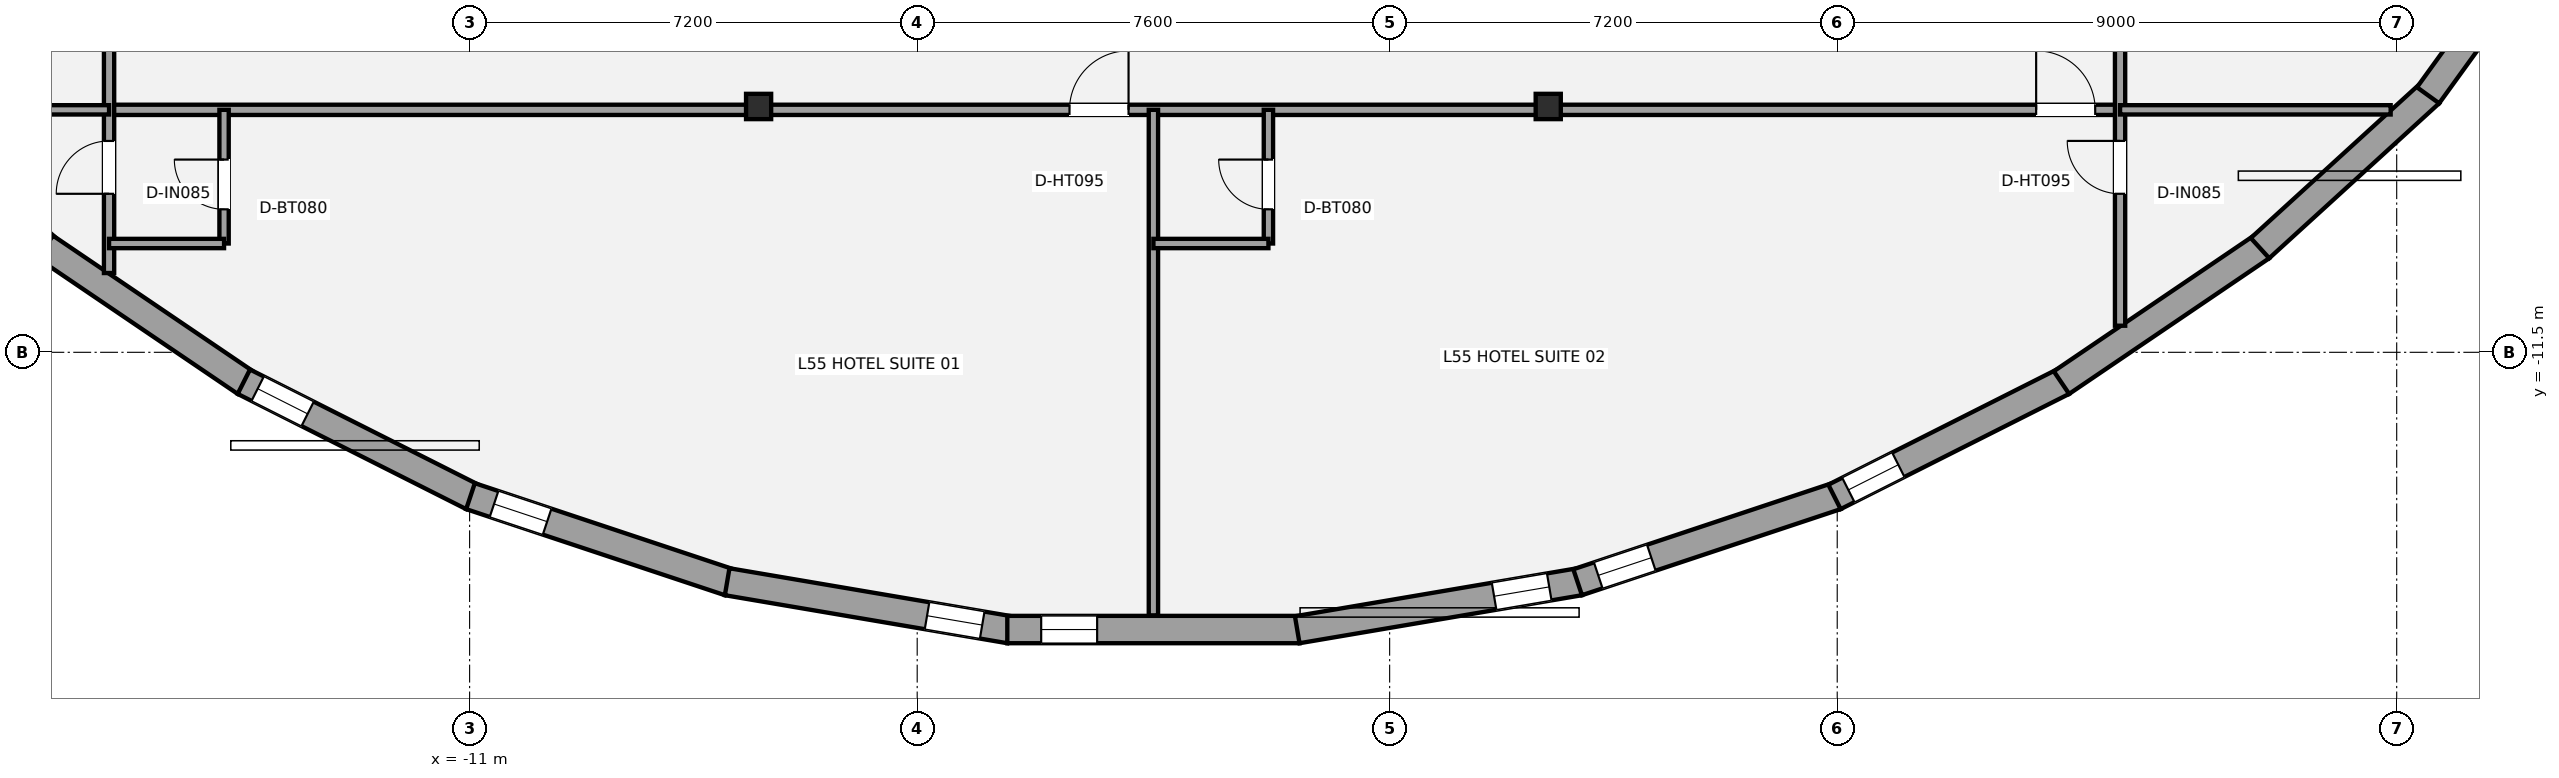
"""IFC4 building model, lengths in metres.
Left out: names, types, materials, properties, quantities, classifications, styles, units other than length and angle.
Written with IfcOpenShell. Run it as: python <this file> out.ifc"""

import sys

from ifc_helpers import new_model, si_unit, direction, frame, frame_2d, origin, origin_2d, place, context, subcontext, project, spatial, rectangle, i_section, extrude, element, fill, save


model = new_model("IFC4")
c1 = context("Model", 3, precision=1e-05, world=origin(), true_north=direction((0.0, 1.0)))
c2 = subcontext(c1, "Body", "Model", "MODEL_VIEW")
j1 = project(units=[si_unit("LENGTHUNIT", "METRE"), si_unit("PLANEANGLEUNIT", "RADIAN")], contexts=[c1])
p1 = place(None, origin())
s1 = spatial("IfcSite", under=j1, at=p1, CompositionType="ELEMENT")
p2 = place(p1, origin())
s2 = spatial("IfcBuilding", under=s1, at=p2, CompositionType="ELEMENT")
p3 = place(p2, frame((0.0, 0.0, 198.2)))
s3 = spatial("IfcBuildingStorey", under=s2, at=p3, CompositionType="ELEMENT", Elevation=198.2)
for number, where, z_axis, x_axis in (
    (1, (-6.351, -7.546, 0.0), (0.0, 0.0, 1.0), (1.0, 0.0, 0.0)),
    (2, (6.351, -7.546, 0.0), (0.0, 0.0, 1.0), (1.0, 0.0, 0.0)),
):
    element("IfcColumn", number, at=place(p3, frame(where, z_axis=z_axis, x_axis=x_axis)), inside=s3, PredefinedType="COLUMN", context=c2, shape_type="SweptSolid", body=[
        extrude(i_section(OverallWidth=0.404, OverallDepth=0.407, WebThickness=0.027, FlangeThickness=0.044, at=origin_2d()), origin(), (0.0, 0.0, 1.0), 3.2),
    ])
p4 = place(p3, frame((-17.801, -9.824, 0.0), z_axis=(0.0, 0.0, 1.0), x_axis=(-0.738992571182, 0.67371357396, 0.0)))
e3 = element("IfcWall", 3, at=p4, inside=s3, PredefinedType="STANDARD", context=c2, shape_type="SweptSolid", body=[
    extrude(rectangle(XDim=3.699, YDim=0.44, at=frame_2d((1.849, 0.0))), origin(), (0.0, 0.0, 1.0), 2.255),
])
p5 = place(p3, frame((-14.607, -11.987, 0.0), z_axis=(0.0, 0.0, 1.0), x_axis=(-0.827697624009, 0.561174342972, 0.0)))
e4 = element("IfcWall", 4, at=p5, inside=s3, PredefinedType="STANDARD", context=c2, shape_type="SweptSolid", body=[
    extrude(rectangle(XDim=3.888, YDim=0.44, at=frame_2d((1.944, 0.0))), origin(), (0.0, 0.0, 1.0), 2.255),
])
p6 = place(p3, frame((-10.956, -13.826, 0.0), z_axis=(0.0, 0.0, 1.0), x_axis=(-0.892939479035, 0.450176728387, 0.0)))
e5 = element("IfcWall", 5, at=p6, inside=s3, PredefinedType="STANDARD", context=c2, shape_type="SweptSolid", body=[
    extrude(rectangle(XDim=4.116, YDim=0.44, at=frame_2d((2.058, 0.0))), origin(), (0.0, 0.0, 1.0), 2.255),
])
p7 = place(p6, frame((2.967, 0.0, 0.58)))
e6 = element("IfcOpeningElement", 6, at=p7, cuts=e5, PredefinedType="OPENING", context=c2, shape_type="SweptSolid", body=[
    extrude(rectangle(XDim=0.9, YDim=1.35, at=frame_2d((0.45, 0.675))), frame((0.0, 0.23, 0.0), z_axis=(0.0, -1.0, 0.0), x_axis=(1.0, 0.0, 0.0)), (0.0, 0.0, 1.0), 0.46),
])
p8 = place(p3, frame((-6.824, -15.198, 0.0), z_axis=(0.0, 0.0, 1.0), x_axis=(-0.94886128517, 0.315693302916, 0.0)))
e7 = element("IfcWall", 7, at=p8, inside=s3, PredefinedType="STANDARD", context=c2, shape_type="SweptSolid", body=[
    extrude(rectangle(XDim=4.386, YDim=0.44, at=frame_2d((2.193, 0.0))), origin(), (0.0, 0.0, 1.0), 2.255),
])
p9 = place(p8, frame((3.087, 0.0, 0.58)))
e8 = element("IfcOpeningElement", 8, at=p9, cuts=e7, PredefinedType="OPENING", context=c2, shape_type="SweptSolid", body=[
    extrude(rectangle(XDim=0.9, YDim=1.35, at=frame_2d((0.45, 0.675))), frame((0.0, 0.23, 0.0), z_axis=(0.0, -1.0, 0.0), x_axis=(1.0, 0.0, 0.0)), (0.0, 0.0, 1.0), 0.46),
])
p10 = place(p3, frame((-2.313, -15.962, 0.0), z_axis=(0.0, 0.0, 1.0), x_axis=(-0.985860485502, 0.167568204398, 0.0)))
e9 = element("IfcWall", 9, at=p10, inside=s3, PredefinedType="STANDARD", context=c2, shape_type="SweptSolid", body=[
    extrude(rectangle(XDim=4.608, YDim=0.44, at=frame_2d((2.304, 0.0))), origin(), (0.0, 0.0, 1.0), 2.255),
])
p11 = place(p10, frame((0.447, 0.0, 0.58)))
e10 = element("IfcOpeningElement", 10, at=p11, cuts=e9, PredefinedType="OPENING", context=c2, shape_type="SweptSolid", body=[
    extrude(rectangle(XDim=0.9, YDim=1.35, at=frame_2d((0.45, 0.675))), frame((0.0, 0.23, 0.0), z_axis=(0.0, -1.0, 0.0), x_axis=(1.0, 0.0, 0.0)), (0.0, 0.0, 1.0), 0.46),
])
p12 = place(p3, frame((2.35, -15.959, 0.0), z_axis=(0.0, 0.0, 1.0), x_axis=(-1.0, 0.0, 0.0)))
e11 = element("IfcWall", 11, at=p12, inside=s3, PredefinedType="STANDARD", context=c2, shape_type="SweptSolid", body=[
    extrude(rectangle(XDim=4.701, YDim=0.44, at=frame_2d((2.35, 0.0))), origin(), (0.0, 0.0, 1.0), 2.255),
])
p13 = place(p12, frame((3.256, 0.0, 0.58)))
e12 = element("IfcOpeningElement", 12, at=p13, cuts=e11, PredefinedType="OPENING", context=c2, shape_type="SweptSolid", body=[
    extrude(rectangle(XDim=0.9, YDim=1.35, at=frame_2d((0.45, 0.675))), frame((0.0, 0.23, 0.0), z_axis=(0.0, -1.0, 0.0), x_axis=(1.0, 0.0, 0.0)), (0.0, 0.0, 1.0), 0.46),
])
p14 = place(p3, frame((6.857, -15.19, 0.0), z_axis=(0.0, 0.0, 1.0), x_axis=(-0.985860485502, -0.167568204398, 0.0)))
e13 = element("IfcWall", 13, at=p14, inside=s3, PredefinedType="STANDARD", context=c2, shape_type="SweptSolid", body=[
    extrude(rectangle(XDim=4.608, YDim=0.44, at=frame_2d((2.304, 0.0))), origin(), (0.0, 0.0, 1.0), 2.255),
])
p15 = place(p14, frame((0.496, 0.0, 0.58)))
e14 = element("IfcOpeningElement", 14, at=p15, cuts=e13, PredefinedType="OPENING", context=c2, shape_type="SweptSolid", body=[
    extrude(rectangle(XDim=0.9, YDim=1.35, at=frame_2d((0.45, 0.675))), frame((0.0, 0.23, 0.0), z_axis=(0.0, -1.0, 0.0), x_axis=(1.0, 0.0, 0.0)), (0.0, 0.0, 1.0), 0.46),
])
p16 = place(p3, frame((10.986, -13.814, 0.0), z_axis=(0.0, 0.0, 1.0), x_axis=(-0.94886128517, -0.315693302916, 0.0)))
e15 = element("IfcWall", 15, at=p16, inside=s3, PredefinedType="STANDARD", context=c2, shape_type="SweptSolid", body=[
    extrude(rectangle(XDim=4.386, YDim=0.44, at=frame_2d((2.193, 0.0))), origin(), (0.0, 0.0, 1.0), 2.255),
])
p17 = place(p16, frame((3.136, 0.0, 0.58)))
e16 = element("IfcOpeningElement", 16, at=p17, cuts=e15, PredefinedType="OPENING", context=c2, shape_type="SweptSolid", body=[
    extrude(rectangle(XDim=0.9, YDim=1.35, at=frame_2d((0.45, 0.675))), frame((0.0, 0.23, 0.0), z_axis=(0.0, -1.0, 0.0), x_axis=(1.0, 0.0, 0.0)), (0.0, 0.0, 1.0), 0.46),
])
p18 = place(p3, frame((14.632, -11.973, 0.0), z_axis=(0.0, 0.0, 1.0), x_axis=(-0.892939479035, -0.450176728387, 0.0)))
e17 = element("IfcWall", 17, at=p18, inside=s3, PredefinedType="STANDARD", context=c2, shape_type="SweptSolid", body=[
    extrude(rectangle(XDim=4.116, YDim=0.44, at=frame_2d((2.058, 0.0))), origin(), (0.0, 0.0, 1.0), 2.255),
])
p19 = place(p18, frame((2.967, 0.0, 0.58)))
e18 = element("IfcOpeningElement", 18, at=p19, cuts=e17, PredefinedType="OPENING", context=c2, shape_type="SweptSolid", body=[
    extrude(rectangle(XDim=0.9, YDim=1.35, at=frame_2d((0.45, 0.675))), frame((0.0, 0.23, 0.0), z_axis=(0.0, -1.0, 0.0), x_axis=(1.0, 0.0, 0.0)), (0.0, 0.0, 1.0), 0.46),
])
p20 = place(p3, frame((17.826, -9.805, 0.0), z_axis=(0.0, 0.0, 1.0), x_axis=(-0.827697624009, -0.561174342972, 0.0)))
e19 = element("IfcWall", 19, at=p20, inside=s3, PredefinedType="STANDARD", context=c2, shape_type="SweptSolid", body=[
    extrude(rectangle(XDim=3.888, YDim=0.44, at=frame_2d((1.944, 0.0))), origin(), (0.0, 0.0, 1.0), 2.255),
])
p21 = place(p3, frame((20.535, -7.333, 0.0), z_axis=(0.0, 0.0, 1.0), x_axis=(-0.738992571182, -0.67371357396, 0.0)))
e20 = element("IfcWall", 20, at=p21, inside=s3, PredefinedType="STANDARD", context=c2, shape_type="SweptSolid", body=[
    extrude(rectangle(XDim=3.699, YDim=0.44, at=frame_2d((1.849, 0.0))), origin(), (0.0, 0.0, 1.0), 2.255),
])
p22 = place(p3, frame((22.547, -4.545, 0.0), z_axis=(0.0, 0.0, 1.0), x_axis=(-0.586378206793, -0.810037405678, 0.0)))
e21 = element("IfcWall", 21, at=p22, inside=s3, PredefinedType="STANDARD", context=c2, shape_type="SweptSolid", body=[
    extrude(rectangle(XDim=3.483, YDim=0.44, at=frame_2d((1.742, 0.0))), origin(), (0.0, 0.0, 1.0), 2.255),
])
p23 = place(p3, frame((-16.8, -7.6, 0.0), z_axis=(0.0, 0.0, 1.0), x_axis=(1.0, 0.0, 0.0)))
e22 = element("IfcWall", 22, at=p23, inside=s3, PredefinedType="PARTITIONING", context=c2, shape_type="SweptSolid", body=[
    extrude(rectangle(XDim=32.35, YDim=0.165, at=frame_2d((16.175, 0.0))), origin(), (0.0, 0.0, 1.0), 2.338),
])
p24 = place(p23, frame((15.45, 0.0, 0.0)))
e23 = element("IfcOpeningElement", 23, at=p24, cuts=e22, PredefinedType="OPENING", context=c2, shape_type="SweptSolid", body=[
    extrude(rectangle(XDim=0.95, YDim=2.15, at=frame_2d((0.475, 1.075))), frame((0.0, 0.093, 0.0), z_axis=(0.0, -1.0, 0.0), x_axis=(1.0, 0.0, 0.0)), (0.0, 0.0, 1.0), 0.185),
])
p25 = place(p23, frame((31.0, 0.0, 0.0)))
e24 = element("IfcOpeningElement", 24, at=p25, cuts=e22, PredefinedType="OPENING", context=c2, shape_type="SweptSolid", body=[
    extrude(rectangle(XDim=0.95, YDim=2.15, at=frame_2d((0.475, 1.075))), frame((0.0, 0.093, 0.0), z_axis=(0.0, -1.0, 0.0), x_axis=(1.0, 0.0, 0.0)), (0.0, 0.0, 1.0), 0.185),
])
p26 = place(p3, frame((-16.8, -10.225, 0.0), z_axis=(0.0, 0.0, 1.0), x_axis=(0.0, 1.0, 0.0)))
e25 = element("IfcWall", 25, at=p26, inside=s3, PredefinedType="PARTITIONING", context=c2, shape_type="SweptSolid", body=[
    extrude(rectangle(XDim=17.775, YDim=0.165, at=frame_2d((8.888, 0.0))), origin(), (0.0, 0.0, 1.0), 2.338),
])
p27 = place(p26, frame((1.274, 0.0, 0.0)))
e26 = element("IfcOpeningElement", 26, at=p27, cuts=e25, PredefinedType="OPENING", context=c2, shape_type="SweptSolid", body=[
    extrude(rectangle(XDim=0.85, YDim=2.1, at=frame_2d((0.425, 1.05))), frame((0.0, 0.093, 0.0), z_axis=(0.0, -1.0, 0.0), x_axis=(1.0, 0.0, 0.0)), (0.0, 0.0, 1.0), 0.185),
])
p28 = place(p26, frame((6.725, 0.0, 0.0)))
e27 = element("IfcOpeningElement", 27, at=p28, cuts=e25, PredefinedType="OPENING", context=c2, shape_type="SweptSolid", body=[
    extrude(rectangle(XDim=1.0, YDim=2.15, at=frame_2d((0.5, 1.075))), frame((0.0, 0.093, 0.0), z_axis=(0.0, -1.0, 0.0), x_axis=(1.0, 0.0, 0.0)), (0.0, 0.0, 1.0), 0.185),
])
p29 = place(p26, frame((14.3, 0.0, 0.0)))
e28 = element("IfcOpeningElement", 28, at=p29, cuts=e25, PredefinedType="OPENING", context=c2, shape_type="SweptSolid", body=[
    extrude(rectangle(XDim=1.0, YDim=2.15, at=frame_2d((0.5, 1.075))), frame((0.0, 0.093, 0.0), z_axis=(0.0, -1.0, 0.0), x_axis=(1.0, 0.0, 0.0)), (0.0, 0.0, 1.0), 0.185),
])
p30 = place(p3, frame((15.55, -11.073, 0.0), z_axis=(0.0, 0.0, 1.0), x_axis=(0.0, 1.0, 0.0)))
e29 = element("IfcWall", 29, at=p30, inside=s3, PredefinedType="PARTITIONING", context=c2, shape_type="SweptSolid", body=[
    extrude(rectangle(XDim=18.623, YDim=0.165, at=frame_2d((9.311, 0.0))), origin(), (0.0, 0.0, 1.0), 2.413),
])
p31 = place(p30, frame((2.123, 0.0, 0.0)))
e30 = element("IfcOpeningElement", 30, at=p31, cuts=e29, PredefinedType="OPENING", context=c2, shape_type="SweptSolid", body=[
    extrude(rectangle(XDim=0.85, YDim=2.1, at=frame_2d((0.425, 1.05))), frame((0.0, 0.093, 0.0), z_axis=(0.0, -1.0, 0.0), x_axis=(1.0, 0.0, 0.0)), (0.0, 0.0, 1.0), 0.185),
])
p32 = place(p30, frame((5.333, 0.0, 0.0)))
e31 = element("IfcOpeningElement", 31, at=p32, cuts=e29, PredefinedType="OPENING", context=c2, shape_type="SweptSolid", body=[
    extrude(rectangle(XDim=1.0, YDim=2.15, at=frame_2d((0.5, 1.075))), frame((0.0, 0.093, 0.0), z_axis=(0.0, -1.0, 0.0), x_axis=(1.0, 0.0, 0.0)), (0.0, 0.0, 1.0), 0.185),
])
p33 = place(p30, frame((11.472, 0.0, 0.0)))
e32 = element("IfcOpeningElement", 32, at=p33, cuts=e29, PredefinedType="OPENING", context=c2, shape_type="SweptSolid", body=[
    extrude(rectangle(XDim=1.0, YDim=2.15, at=frame_2d((0.5, 1.075))), frame((0.0, 0.093, 0.0), z_axis=(0.0, -1.0, 0.0), x_axis=(1.0, 0.0, 0.0)), (0.0, 0.0, 1.0), 0.185),
])
p34 = place(p30, frame((15.847, 0.0, 0.0)))
e33 = element("IfcOpeningElement", 33, at=p34, cuts=e29, PredefinedType="OPENING", context=c2, shape_type="SweptSolid", body=[
    extrude(rectangle(XDim=1.0, YDim=2.15, at=frame_2d((0.5, 1.075))), frame((0.0, 0.093, 0.0), z_axis=(0.0, -1.0, 0.0), x_axis=(1.0, 0.0, 0.0)), (0.0, 0.0, 1.0), 0.185),
])
p35 = place(p3, frame((-19.903, -7.6, 0.0), z_axis=(0.0, 0.0, 1.0), x_axis=(1.0, 0.0, 0.0)))
e34 = element("IfcWall", 34, at=p35, inside=s3, PredefinedType="PLUMBINGWALL", context=c2, shape_type="SweptSolid", body=[
    extrude(rectangle(XDim=3.103, YDim=0.15, at=frame_2d((1.551, 0.0))), origin(), (0.0, 0.0, 1.0), 2.96),
])
p36 = place(p3, frame((15.55, -7.6, 0.0), z_axis=(0.0, 0.0, 1.0), x_axis=(1.0, 0.0, 0.0)))
e35 = element("IfcWall", 35, at=p36, inside=s3, PredefinedType="PLUMBINGWALL", context=c2, shape_type="SweptSolid", body=[
    extrude(rectangle(XDim=4.353, YDim=0.15, at=frame_2d((2.176, 0.0))), origin(), (0.0, 0.0, 1.0), 2.96),
])
p37 = place(p3, frame((0.0, -15.731, 0.0), z_axis=(0.0, 0.0, 1.0), x_axis=(0.0, 1.0, 0.0)))
e36 = element("IfcWall", 36, at=p37, inside=s3, PredefinedType="PLUMBINGWALL", context=c2, shape_type="SweptSolid", body=[
    extrude(rectangle(XDim=8.131, YDim=0.15, at=frame_2d((4.065, 0.0))), origin(), (0.0, 0.0, 1.0), 2.413),
])
p38 = place(p3, frame((-14.95, -9.75, 0.0), z_axis=(0.0, 0.0, 1.0), x_axis=(0.0, 1.0, 0.0)))
e37 = element("IfcWall", 37, at=p38, inside=s3, PredefinedType="PLUMBINGWALL", context=c2, shape_type="SweptSolid", body=[
    extrude(rectangle(XDim=2.15, YDim=0.15, at=frame_2d((1.075, 0.0))), origin(), (0.0, 0.0, 1.0), 2.96),
])
p39 = place(p38, frame((0.55, 0.0, 0.0)))
e38 = element("IfcOpeningElement", 38, at=p39, cuts=e37, PredefinedType="OPENING", context=c2, shape_type="SweptSolid", body=[
    extrude(rectangle(XDim=0.8, YDim=2.1, at=frame_2d((0.4, 1.05))), frame((0.0, 0.085, 0.0), z_axis=(0.0, -1.0, 0.0), x_axis=(1.0, 0.0, 0.0)), (0.0, 0.0, 1.0), 0.17),
])
p40 = place(p3, frame((-16.8, -9.75, 0.0), z_axis=(0.0, 0.0, 1.0), x_axis=(1.0, 0.0, 0.0)))
e39 = element("IfcWall", 39, at=p40, inside=s3, PredefinedType="PLUMBINGWALL", context=c2, shape_type="SweptSolid", body=[
    extrude(rectangle(XDim=1.85, YDim=0.15, at=frame_2d((0.925, 0.0))), origin(), (0.0, 0.0, 1.0), 2.413),
])
p41 = place(p3, frame((1.85, -9.75, 0.0), z_axis=(0.0, 0.0, 1.0), x_axis=(0.0, 1.0, 0.0)))
e40 = element("IfcWall", 40, at=p41, inside=s3, PredefinedType="PLUMBINGWALL", context=c2, shape_type="SweptSolid", body=[
    extrude(rectangle(XDim=2.15, YDim=0.15, at=frame_2d((1.075, 0.0))), origin(), (0.0, 0.0, 1.0), 2.96),
])
p42 = place(p41, frame((0.55, 0.0, 0.0)))
e41 = element("IfcOpeningElement", 41, at=p42, cuts=e40, PredefinedType="OPENING", context=c2, shape_type="SweptSolid", body=[
    extrude(rectangle(XDim=0.8, YDim=2.1, at=frame_2d((0.4, 1.05))), frame((0.0, 0.085, 0.0), z_axis=(0.0, -1.0, 0.0), x_axis=(1.0, 0.0, 0.0)), (0.0, 0.0, 1.0), 0.17),
])
p43 = place(p3, frame((0.0, -9.75, 0.0), z_axis=(0.0, 0.0, 1.0), x_axis=(1.0, 0.0, 0.0)))
e42 = element("IfcWall", 42, at=p43, inside=s3, PredefinedType="PLUMBINGWALL", context=c2, shape_type="SweptSolid", body=[
    extrude(rectangle(XDim=1.85, YDim=0.15, at=frame_2d((0.925, 0.0))), origin(), (0.0, 0.0, 1.0), 2.96),
])
p44 = place(p7, origin())
e43 = element("IfcWindow", 43, at=p44, inside=s3, PartitioningType="SINGLE_PANEL", PredefinedType="WINDOW", context=c2, shape_type="SweptSolid", body=[
    extrude(rectangle(XDim=0.9, YDim=1.35, at=frame_2d((0.45, 0.675))), frame((0.0, -0.01, 0.0), z_axis=(0.0, -1.0, 0.0), x_axis=(1.0, 0.0, 0.0)), (0.0, 0.0, 1.0), 0.06),
])
fill(e6, e43)
p45 = place(p9, origin())
e44 = element("IfcWindow", 44, at=p45, inside=s3, PartitioningType="SINGLE_PANEL", PredefinedType="WINDOW", context=c2, shape_type="SweptSolid", body=[
    extrude(rectangle(XDim=0.9, YDim=1.35, at=frame_2d((0.45, 0.675))), frame((0.0, -0.01, 0.0), z_axis=(0.0, -1.0, 0.0), x_axis=(1.0, 0.0, 0.0)), (0.0, 0.0, 1.0), 0.06),
])
fill(e8, e44)
p46 = place(p11, origin())
e45 = element("IfcWindow", 45, at=p46, inside=s3, PartitioningType="SINGLE_PANEL", PredefinedType="WINDOW", context=c2, shape_type="SweptSolid", body=[
    extrude(rectangle(XDim=0.9, YDim=1.35, at=frame_2d((0.45, 0.675))), frame((0.0, -0.01, 0.0), z_axis=(0.0, -1.0, 0.0), x_axis=(1.0, 0.0, 0.0)), (0.0, 0.0, 1.0), 0.06),
])
fill(e10, e45)
p47 = place(p13, origin())
e46 = element("IfcWindow", 46, at=p47, inside=s3, PartitioningType="SINGLE_PANEL", PredefinedType="WINDOW", context=c2, shape_type="SweptSolid", body=[
    extrude(rectangle(XDim=0.9, YDim=1.35, at=frame_2d((0.45, 0.675))), frame((0.0, -0.01, 0.0), z_axis=(0.0, -1.0, 0.0), x_axis=(1.0, 0.0, 0.0)), (0.0, 0.0, 1.0), 0.06),
])
fill(e12, e46)
p48 = place(p15, origin())
e47 = element("IfcWindow", 47, at=p48, inside=s3, PartitioningType="SINGLE_PANEL", PredefinedType="WINDOW", context=c2, shape_type="SweptSolid", body=[
    extrude(rectangle(XDim=0.9, YDim=1.35, at=frame_2d((0.45, 0.675))), frame((0.0, -0.01, 0.0), z_axis=(0.0, -1.0, 0.0), x_axis=(1.0, 0.0, 0.0)), (0.0, 0.0, 1.0), 0.06),
])
fill(e14, e47)
p49 = place(p17, origin())
e48 = element("IfcWindow", 48, at=p49, inside=s3, PartitioningType="SINGLE_PANEL", PredefinedType="WINDOW", context=c2, shape_type="SweptSolid", body=[
    extrude(rectangle(XDim=0.9, YDim=1.35, at=frame_2d((0.45, 0.675))), frame((0.0, -0.01, 0.0), z_axis=(0.0, -1.0, 0.0), x_axis=(1.0, 0.0, 0.0)), (0.0, 0.0, 1.0), 0.06),
])
fill(e16, e48)
p50 = place(p19, origin())
e49 = element("IfcWindow", 49, at=p50, inside=s3, PartitioningType="SINGLE_PANEL", PredefinedType="WINDOW", context=c2, shape_type="SweptSolid", body=[
    extrude(rectangle(XDim=0.9, YDim=1.35, at=frame_2d((0.45, 0.675))), frame((0.0, -0.01, 0.0), z_axis=(0.0, -1.0, 0.0), x_axis=(1.0, 0.0, 0.0)), (0.0, 0.0, 1.0), 0.06),
])
fill(e18, e49)
p51 = place(p27, origin())
e50 = element("IfcDoor", 50, at=p51, inside=s3, OperationType="SINGLE_SWING_LEFT", PredefinedType="DOOR", context=c2, shape_type="SweptSolid", body=[
    extrude(rectangle(XDim=0.85, YDim=2.1, at=frame_2d((0.425, 1.05))), frame((0.0, 0.025, 0.0), z_axis=(0.0, -1.0, 0.0), x_axis=(1.0, 0.0, 0.0)), (0.0, 0.0, 1.0), 0.05),
])
fill(e26, e50)
p52 = place(p31, origin())
e51 = element("IfcDoor", 51, at=p52, inside=s3, OperationType="SINGLE_SWING_RIGHT", PredefinedType="DOOR", context=c2, shape_type="SweptSolid", body=[
    extrude(rectangle(XDim=0.85, YDim=2.1, at=frame_2d((0.425, 1.05))), frame((0.0, 0.025, 0.0), z_axis=(0.0, -1.0, 0.0), x_axis=(1.0, 0.0, 0.0)), (0.0, 0.0, 1.0), 0.05),
])
fill(e30, e51)
p53 = place(p24, origin())
e52 = element("IfcDoor", 52, at=p53, inside=s3, OperationType="SINGLE_SWING_RIGHT", PredefinedType="DOOR", context=c2, shape_type="SweptSolid", body=[
    extrude(rectangle(XDim=0.95, YDim=2.15, at=frame_2d((0.475, 1.075))), frame((0.0, 0.025, 0.0), z_axis=(0.0, -1.0, 0.0), x_axis=(1.0, 0.0, 0.0)), (0.0, 0.0, 1.0), 0.05),
])
fill(e23, e52)
p54 = place(p39, origin())
e53 = element("IfcDoor", 53, at=p54, inside=s3, OperationType="SINGLE_SWING_RIGHT", PredefinedType="DOOR", context=c2, shape_type="SweptSolid", body=[
    extrude(rectangle(XDim=0.8, YDim=2.1, at=frame_2d((0.4, 1.05))), frame((0.0, 0.025, 0.0), z_axis=(0.0, -1.0, 0.0), x_axis=(1.0, 0.0, 0.0)), (0.0, 0.0, 1.0), 0.05),
])
fill(e38, e53)
p55 = place(p25, origin())
e54 = element("IfcDoor", 54, at=p55, inside=s3, OperationType="SINGLE_SWING_LEFT", PredefinedType="DOOR", context=c2, shape_type="SweptSolid", body=[
    extrude(rectangle(XDim=0.95, YDim=2.15, at=frame_2d((0.475, 1.075))), frame((0.0, 0.025, 0.0), z_axis=(0.0, -1.0, 0.0), x_axis=(1.0, 0.0, 0.0)), (0.0, 0.0, 1.0), 0.05),
])
fill(e24, e54)
p56 = place(p42, origin())
e55 = element("IfcDoor", 55, at=p56, inside=s3, OperationType="SINGLE_SWING_RIGHT", PredefinedType="DOOR", context=c2, shape_type="SweptSolid", body=[
    extrude(rectangle(XDim=0.8, YDim=2.1, at=frame_2d((0.4, 1.05))), frame((0.0, 0.025, 0.0), z_axis=(0.0, -1.0, 0.0), x_axis=(1.0, 0.0, 0.0)), (0.0, 0.0, 1.0), 0.05),
])
fill(e41, e55)
save(model, sys.argv[1])
